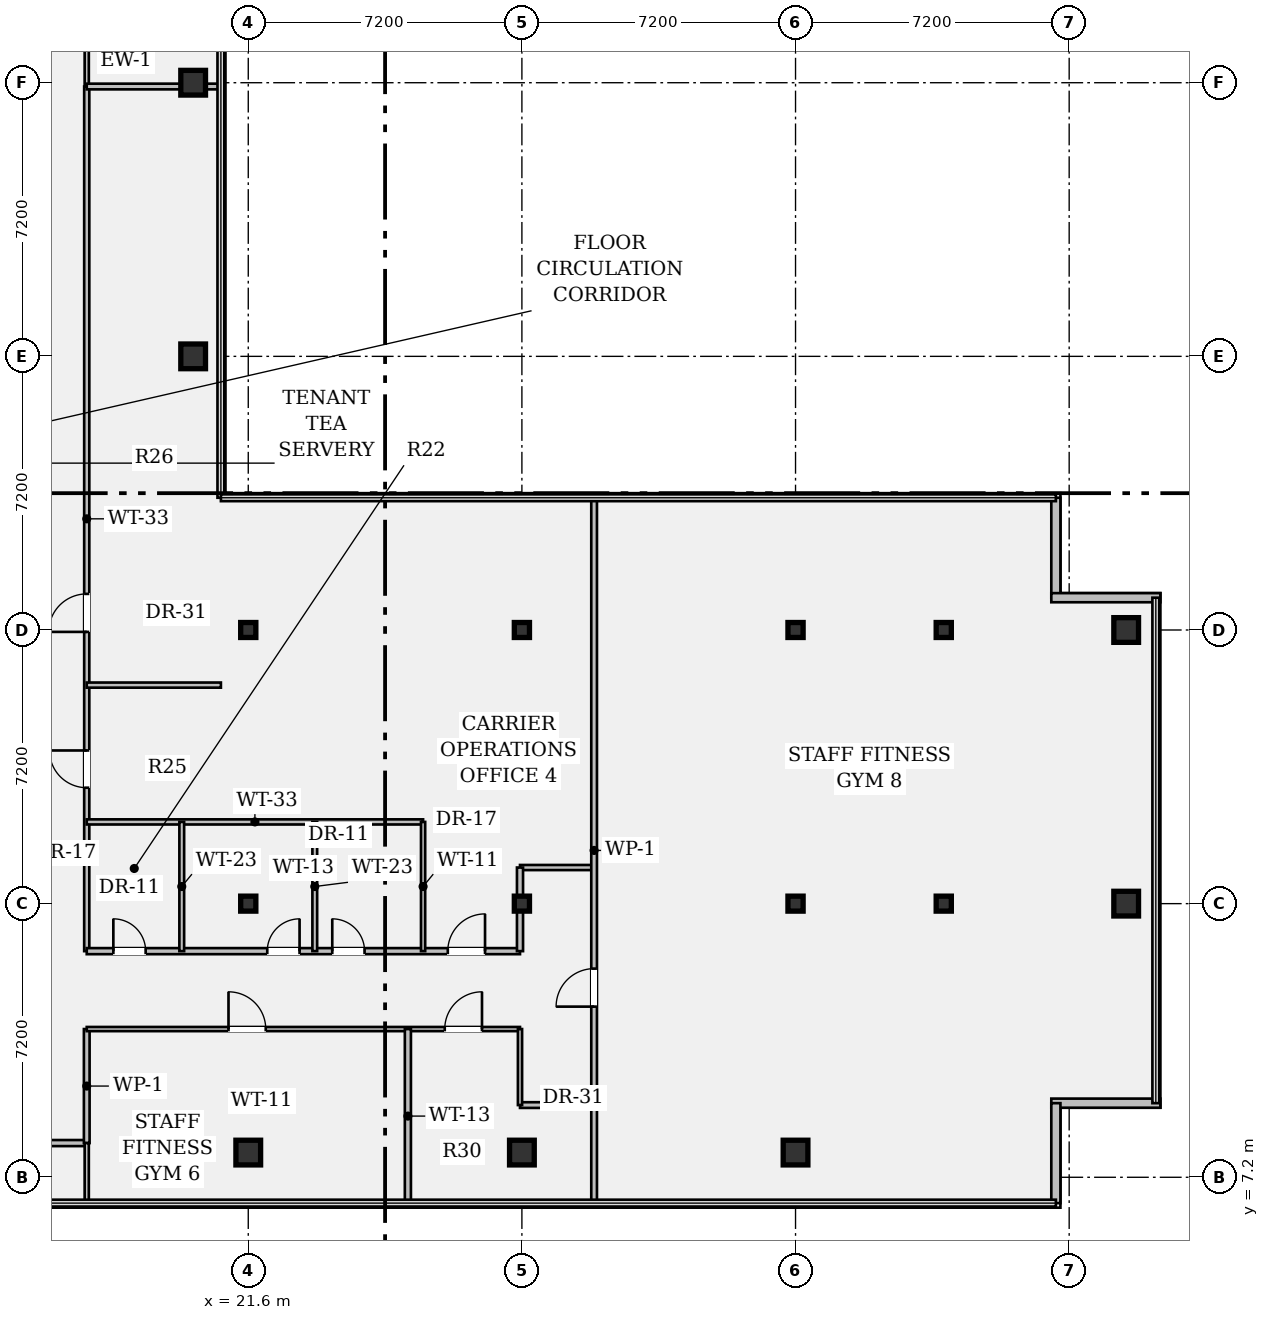
"""IFC4 building model, lengths in metres.
Left out: names, types, materials, properties, quantities, classifications, styles, units other than length and angle.
Written with IfcOpenShell. Run it as: python <this file> out.ifc"""

import sys

from ifc_helpers import new_model, si_unit, direction, frame, frame_2d, origin, origin_2d, place, context, subcontext, project, spatial, rectangle, hollow_rectangle, i_section, extrude, element, fill, save


model = new_model("IFC4")
c1 = context("Model", 3, precision=1e-05, world=origin(), true_north=direction((0.0, 1.0)))
c2 = subcontext(c1, "Body", "Model", "MODEL_VIEW")
j1 = project(units=[si_unit("LENGTHUNIT", "METRE"), si_unit("PLANEANGLEUNIT", "RADIAN")], contexts=[c1])
p1 = place(None, origin())
s1 = spatial("IfcSite", under=j1, at=p1, CompositionType="ELEMENT")
p2 = place(p1, origin())
s2 = spatial("IfcBuilding", under=s1, at=p2, CompositionType="ELEMENT")
p3 = place(p2, frame((0.0, 0.0, 276.15)))
s3 = spatial("IfcBuildingStorey", under=s2, at=p3, CompositionType="ELEMENT", Elevation=276.15)
for number, where, z_axis, x_axis in (
    (1, (20.15, 28.8, 0.0), (0.0, 0.0, 1.0), (1.0, 0.0, 0.0)),
    (2, (20.15, 36.0, 0.0), (0.0, 0.0, 1.0), (1.0, 0.0, 0.0)),
    (3, (21.6, 7.85, 0.0), (0.0, 0.0, 1.0), (1.0, 0.0, 0.0)),
):
    element("IfcColumn", number, at=place(p3, frame(where, z_axis=z_axis, x_axis=x_axis)), inside=s3, PredefinedType="COLUMN", context=c2, shape_type="SweptSolid", body=[
        extrude(hollow_rectangle(XDim=0.65, YDim=0.65, WallThickness=0.04, at=origin_2d()), origin(), (0.0, 0.0, 1.0), 3.24),
    ])
for number, where, z_axis, x_axis in (
    (4, (21.6, 14.4, 0.0), (0.0, 0.0, 1.0), (1.0, 0.0, 0.0)),
    (5, (21.6, 21.6, 0.0), (0.0, 0.0, 1.0), (1.0, 0.0, 0.0)),
):
    element("IfcColumn", number, at=place(p3, frame(where, z_axis=z_axis, x_axis=x_axis)), inside=s3, PredefinedType="COLUMN", context=c2, shape_type="SweptSolid", body=[
        extrude(i_section(OverallWidth=0.399, OverallDepth=0.394, WebThickness=0.023, FlangeThickness=0.037, FilletRadius=0.018, at=origin_2d()), origin(), (0.0, 0.0, 1.0), 3.24),
    ])
p4 = place(p3, frame((28.8, 7.85, 0.0), z_axis=(0.0, 0.0, 1.0), x_axis=(1.0, 0.0, 0.0)))
e6 = element("IfcColumn", 6, at=p4, inside=s3, PredefinedType="COLUMN", context=c2, shape_type="SweptSolid", body=[
    extrude(hollow_rectangle(XDim=0.65, YDim=0.65, WallThickness=0.04, at=origin_2d()), origin(), (0.0, 0.0, 1.0), 3.24),
])
for number, where, z_axis, x_axis in (
    (7, (28.8, 14.4, 0.0), (0.0, 0.0, 1.0), (1.0, 0.0, 0.0)),
    (8, (28.8, 21.6, 0.0), (0.0, 0.0, 1.0), (1.0, 0.0, 0.0)),
):
    element("IfcColumn", number, at=place(p3, frame(where, z_axis=z_axis, x_axis=x_axis)), inside=s3, PredefinedType="COLUMN", context=c2, shape_type="SweptSolid", body=[
        extrude(i_section(OverallWidth=0.399, OverallDepth=0.394, WebThickness=0.023, FlangeThickness=0.037, FilletRadius=0.018, at=origin_2d()), origin(), (0.0, 0.0, 1.0), 3.24),
    ])
p5 = place(p3, frame((36.0, 7.85, 0.0), z_axis=(0.0, 0.0, 1.0), x_axis=(1.0, 0.0, 0.0)))
e9 = element("IfcColumn", 9, at=p5, inside=s3, PredefinedType="COLUMN", context=c2, shape_type="SweptSolid", body=[
    extrude(hollow_rectangle(XDim=0.65, YDim=0.65, WallThickness=0.04, at=origin_2d()), origin(), (0.0, 0.0, 1.0), 3.24),
])
for number, where, z_axis, x_axis in (
    (10, (36.0, 14.4, 0.0), (0.0, 0.0, 1.0), (1.0, 0.0, 0.0)),
    (11, (36.0, 21.6, 0.0), (0.0, 0.0, 1.0), (1.0, 0.0, 0.0)),
    (12, (39.9, 14.4, 0.0), (0.0, 0.0, 1.0), (1.0, 0.0, 0.0)),
    (13, (39.9, 21.6, 0.0), (0.0, 0.0, 1.0), (1.0, 0.0, 0.0)),
):
    element("IfcColumn", number, at=place(p3, frame(where, z_axis=z_axis, x_axis=x_axis)), inside=s3, PredefinedType="COLUMN", context=c2, shape_type="SweptSolid", body=[
        extrude(i_section(OverallWidth=0.399, OverallDepth=0.394, WebThickness=0.023, FlangeThickness=0.037, FilletRadius=0.018, at=origin_2d()), origin(), (0.0, 0.0, 1.0), 3.24),
    ])
for number, where, z_axis, x_axis in (
    (14, (44.7, 14.4, 0.0), (0.0, 0.0, 1.0), (1.0, 0.0, 0.0)),
    (15, (44.7, 21.6, 0.0), (0.0, 0.0, 1.0), (1.0, 0.0, 0.0)),
):
    element("IfcColumn", number, at=place(p3, frame(where, z_axis=z_axis, x_axis=x_axis)), inside=s3, PredefinedType="COLUMN", context=c2, shape_type="SweptSolid", body=[
        extrude(hollow_rectangle(XDim=0.65, YDim=0.65, WallThickness=0.04, at=origin_2d()), origin(), (0.0, 0.0, 1.0), 3.24),
    ])
p6 = place(p3, frame((42.85, 25.08, 0.0), z_axis=(0.0, 0.0, 1.0), x_axis=(0.0, -1.0, 0.0)))
e16 = element("IfcWall", 16, at=p6, inside=s3, PredefinedType="STANDARD", context=c2, shape_type="SweptSolid", body=[
    extrude(rectangle(XDim=2.63, YDim=0.24, at=frame_2d((1.315, 0.0))), origin(), (0.0, 0.0, 1.0), 3.24),
])
for number, where, z_axis, x_axis in (
    (17, (42.73, 22.45, 0.0), (0.0, 0.0, 1.0), (1.0, 0.0, 0.0)),
    (18, (45.6, 9.15, 0.0), (0.0, 0.0, 1.0), (-1.0, 0.0, 0.0)),
):
    element("IfcWall", number, at=place(p3, frame(where, z_axis=z_axis, x_axis=x_axis)), inside=s3, PredefinedType="STANDARD", context=c2, shape_type="SweptSolid", body=[
        extrude(rectangle(XDim=2.87, YDim=0.24, at=frame_2d((1.435, 0.0))), origin(), (0.0, 0.0, 1.0), 3.24),
    ])
p7 = place(p3, frame((42.85, 9.15, 0.0), z_axis=(0.0, 0.0, 1.0), x_axis=(0.0, -1.0, 0.0)))
e19 = element("IfcWall", 19, at=p7, inside=s3, PredefinedType="STANDARD", context=c2, shape_type="SweptSolid", body=[
    extrude(rectangle(XDim=2.63, YDim=0.24, at=frame_2d((1.315, 0.0))), origin(), (0.0, 0.0, 1.0), 3.24),
])
p8 = place(p3, frame((14.4, 8.1, 0.0), z_axis=(0.0, 0.0, 1.0), x_axis=(1.0, 0.0, 0.0)))
e20 = element("IfcWall", 20, at=p8, inside=s3, PredefinedType="PARTITIONING", context=c2, shape_type="SweptSolid", body=[
    extrude(rectangle(XDim=2.95, YDim=0.16, at=frame_2d((1.475, 0.0))), origin(), (0.0, 0.0, 1.0), 3.24),
])
p9 = place(p8, frame((0.95, 0.0, 0.0)))
e21 = element("IfcOpeningElement", 21, at=p9, cuts=e20, PredefinedType="OPENING", context=c2, shape_type="SweptSolid", body=[
    extrude(rectangle(XDim=0.98, YDim=2.15, at=frame_2d((0.49, 1.075))), frame((0.0, 0.092, 0.0), z_axis=(0.0, -1.0, 0.0), x_axis=(1.0, 0.0, 0.0)), (0.0, 0.0, 1.0), 0.184),
])
p10 = place(p3, frame((17.35, 8.1, 0.0), z_axis=(0.0, 0.0, 1.0), x_axis=(0.0, 1.0, 0.0)))
e22 = element("IfcWall", 22, at=p10, inside=s3, PredefinedType="PARTITIONING", context=c2, shape_type="SweptSolid", body=[
    extrude(rectangle(XDim=3.0, YDim=0.15, at=frame_2d((1.5, 0.0))), origin(), (0.0, 0.0, 1.0), 3.24),
])
p11 = place(p3, frame((17.35, 13.15, 0.0), z_axis=(0.0, 0.0, 1.0), x_axis=(0.0, 1.0, 0.0)))
e23 = element("IfcWall", 23, at=p11, inside=s3, PredefinedType="PARTITIONING", context=c2, shape_type="SweptSolid", body=[
    extrude(rectangle(XDim=22.75, YDim=0.135, at=frame_2d((11.375, 0.0))), origin(), (0.0, 0.0, 1.0), 2.676),
])
p12 = place(p11, frame((4.3, 0.0, 0.0)))
e24 = element("IfcOpeningElement", 24, at=p12, cuts=e23, PredefinedType="OPENING", context=c2, shape_type="SweptSolid", body=[
    extrude(rectangle(XDim=0.98, YDim=2.15, at=frame_2d((0.49, 1.075))), frame((0.0, 0.08, 0.0), z_axis=(0.0, -1.0, 0.0), x_axis=(1.0, 0.0, 0.0)), (0.0, 0.0, 1.0), 0.159),
])
p13 = place(p11, frame((8.4, 0.0, 0.0)))
e25 = element("IfcOpeningElement", 25, at=p13, cuts=e23, PredefinedType="OPENING", context=c2, shape_type="SweptSolid", body=[
    extrude(rectangle(XDim=1.0, YDim=2.15, at=frame_2d((0.5, 1.075))), frame((0.0, 0.08, 0.0), z_axis=(0.0, -1.0, 0.0), x_axis=(1.0, 0.0, 0.0)), (0.0, 0.0, 1.0), 0.159),
])
p14 = place(p3, frame((17.35, 11.1, 0.0), z_axis=(0.0, 0.0, 1.0), x_axis=(1.0, 0.0, 0.0)))
e26 = element("IfcWall", 26, at=p14, inside=s3, PredefinedType="PARTITIONING", context=c2, shape_type="SweptSolid", body=[
    extrude(rectangle(XDim=11.4, YDim=0.11, at=frame_2d((5.7, 0.0))), origin(), (0.0, 0.0, 1.0), 2.676),
])
p15 = place(p14, frame((3.73, 0.0, 0.0)))
e27 = element("IfcOpeningElement", 27, at=p15, cuts=e26, PredefinedType="OPENING", context=c2, shape_type="SweptSolid", body=[
    extrude(rectangle(XDim=0.98, YDim=2.15, at=frame_2d((0.49, 1.075))), frame((0.0, 0.067, 0.0), z_axis=(0.0, -1.0, 0.0), x_axis=(1.0, 0.0, 0.0)), (0.0, 0.0, 1.0), 0.134),
])
p16 = place(p14, frame((9.42, 0.0, 0.0)))
e28 = element("IfcOpeningElement", 28, at=p16, cuts=e26, PredefinedType="OPENING", context=c2, shape_type="SweptSolid", body=[
    extrude(rectangle(XDim=0.98, YDim=2.15, at=frame_2d((0.49, 1.075))), frame((0.0, 0.067, 0.0), z_axis=(0.0, -1.0, 0.0), x_axis=(1.0, 0.0, 0.0)), (0.0, 0.0, 1.0), 0.134),
])
p17 = place(p3, frame((17.35, 13.15, 0.0), z_axis=(0.0, 0.0, 1.0), x_axis=(1.0, 0.0, 0.0)))
e29 = element("IfcWall", 29, at=p17, inside=s3, PredefinedType="PARTITIONING", context=c2, shape_type="SweptSolid", body=[
    extrude(rectangle(XDim=11.4, YDim=0.16, at=frame_2d((5.7, 0.0))), origin(), (0.0, 0.0, 1.0), 2.676),
])
p18 = place(p17, frame((0.7, 0.0, 0.0)))
e30 = element("IfcOpeningElement", 30, at=p18, cuts=e29, PredefinedType="OPENING", context=c2, shape_type="SweptSolid", body=[
    extrude(rectangle(XDim=0.85, YDim=2.15, at=frame_2d((0.425, 1.075))), frame((0.0, 0.092, 0.0), z_axis=(0.0, -1.0, 0.0), x_axis=(1.0, 0.0, 0.0)), (0.0, 0.0, 1.0), 0.184),
])
p19 = place(p17, frame((4.75, 0.0, 0.0)))
e31 = element("IfcOpeningElement", 31, at=p19, cuts=e29, PredefinedType="OPENING", context=c2, shape_type="SweptSolid", body=[
    extrude(rectangle(XDim=0.85, YDim=2.15, at=frame_2d((0.425, 1.075))), frame((0.0, 0.092, 0.0), z_axis=(0.0, -1.0, 0.0), x_axis=(1.0, 0.0, 0.0)), (0.0, 0.0, 1.0), 0.184),
])
p20 = place(p17, frame((6.46, 0.0, 0.0)))
e32 = element("IfcOpeningElement", 32, at=p20, cuts=e29, PredefinedType="OPENING", context=c2, shape_type="SweptSolid", body=[
    extrude(rectangle(XDim=0.85, YDim=2.15, at=frame_2d((0.425, 1.075))), frame((0.0, 0.092, 0.0), z_axis=(0.0, -1.0, 0.0), x_axis=(1.0, 0.0, 0.0)), (0.0, 0.0, 1.0), 0.184),
])
p21 = place(p17, frame((9.5, 0.0, 0.0)))
e33 = element("IfcOpeningElement", 33, at=p21, cuts=e29, PredefinedType="OPENING", context=c2, shape_type="SweptSolid", body=[
    extrude(rectangle(XDim=0.98, YDim=2.15, at=frame_2d((0.49, 1.075))), frame((0.0, 0.092, 0.0), z_axis=(0.0, -1.0, 0.0), x_axis=(1.0, 0.0, 0.0)), (0.0, 0.0, 1.0), 0.184),
])
p22 = place(p3, frame((28.75, 9.1, 0.0), z_axis=(0.0, 0.0, 1.0), x_axis=(1.0, 0.0, 0.0)))
e34 = element("IfcWall", 34, at=p22, inside=s3, PredefinedType="PARTITIONING", context=c2, shape_type="SweptSolid", body=[
    extrude(rectangle(XDim=1.95, YDim=0.15, at=frame_2d((0.975, 0.0))), origin(), (0.0, 0.0, 1.0), 2.676),
])
p23 = place(p3, frame((28.75, 15.35, 0.0), z_axis=(0.0, 0.0, 1.0), x_axis=(1.0, 0.0, 0.0)))
e35 = element("IfcWall", 35, at=p23, inside=s3, PredefinedType="PARTITIONING", context=c2, shape_type="SweptSolid", body=[
    extrude(rectangle(XDim=1.95, YDim=0.135, at=frame_2d((0.975, 0.0))), origin(), (0.0, 0.0, 1.0), 2.676),
])
p24 = place(p3, frame((28.75, 9.1, 0.0), z_axis=(0.0, 0.0, 1.0), x_axis=(0.0, 1.0, 0.0)))
e36 = element("IfcWall", 36, at=p24, inside=s3, PredefinedType="PARTITIONING", context=c2, shape_type="SweptSolid", body=[
    extrude(rectangle(XDim=2.0, YDim=0.11, at=frame_2d((1.0, 0.0))), origin(), (0.0, 0.0, 1.0), 2.676),
])
p25 = place(p3, frame((28.75, 13.15, 0.0), z_axis=(0.0, 0.0, 1.0), x_axis=(0.0, 1.0, 0.0)))
e37 = element("IfcWall", 37, at=p25, inside=s3, PredefinedType="PARTITIONING", context=c2, shape_type="SweptSolid", body=[
    extrude(rectangle(XDim=2.2, YDim=0.16, at=frame_2d((1.1, 0.0))), origin(), (0.0, 0.0, 1.0), 2.676),
])
p26 = place(p3, frame((30.7, 6.52, 0.0), z_axis=(0.0, 0.0, 1.0), x_axis=(0.0, 1.0, 0.0)))
e38 = element("IfcWall", 38, at=p26, inside=s3, PredefinedType="PARTITIONING", context=c2, shape_type="SweptSolid", body=[
    extrude(rectangle(XDim=18.56, YDim=0.15, at=frame_2d((9.28, 0.0))), origin(), (0.0, 0.0, 1.0), 2.676),
])
p27 = place(p26, frame((5.17, 0.0, 0.0)))
e39 = element("IfcOpeningElement", 39, at=p27, cuts=e38, PredefinedType="OPENING", context=c2, shape_type="SweptSolid", body=[
    extrude(rectangle(XDim=1.0, YDim=2.15, at=frame_2d((0.5, 1.075))), frame((0.0, 0.087, 0.0), z_axis=(0.0, -1.0, 0.0), x_axis=(1.0, 0.0, 0.0)), (0.0, 0.0, 1.0), 0.174),
])
p28 = place(p3, frame((17.35, 35.9, 0.0), z_axis=(0.0, 0.0, 1.0), x_axis=(0.0, 1.0, 0.0)))
e40 = element("IfcWall", 40, at=p28, inside=s3, PredefinedType="PARTITIONING", context=c2, shape_type="SweptSolid", body=[
    extrude(rectangle(XDim=2.4, YDim=0.11, at=frame_2d((1.2, 0.0))), origin(), (0.0, 0.0, 1.0), 2.676),
])
p29 = place(p3, frame((17.35, 35.9, 0.0), z_axis=(0.0, 0.0, 1.0), x_axis=(1.0, 0.0, 0.0)))
e41 = element("IfcWall", 41, at=p29, inside=s3, PredefinedType="PARTITIONING", context=c2, shape_type="SweptSolid", body=[
    extrude(rectangle(XDim=3.53, YDim=0.15, at=frame_2d((1.765, 0.0))), origin(), (0.0, 0.0, 1.0), 2.676),
])
p30 = place(p3, frame((17.35, 16.55, 0.0), z_axis=(0.0, 0.0, 1.0), x_axis=(1.0, 0.0, 0.0)))
e42 = element("IfcWall", 42, at=p30, inside=s3, PredefinedType="PARTITIONING", context=c2, shape_type="SweptSolid", body=[
    extrude(rectangle(XDim=8.85, YDim=0.135, at=frame_2d((4.425, 0.0))), origin(), (0.0, 0.0, 1.0), 2.676),
])
p31 = place(p3, frame((26.2, 13.15, 0.0), z_axis=(0.0, 0.0, 1.0), x_axis=(0.0, 1.0, 0.0)))
e43 = element("IfcWall", 43, at=p31, inside=s3, PredefinedType="PARTITIONING", context=c2, shape_type="SweptSolid", body=[
    extrude(rectangle(XDim=3.4, YDim=0.11, at=frame_2d((1.7, 0.0))), origin(), (0.0, 0.0, 1.0), 2.676),
])
for number, where, z_axis, x_axis in (
    (44, (19.85, 13.15, 0.0), (0.0, 0.0, 1.0), (0.0, 1.0, 0.0)),
    (45, (23.35, 13.15, 0.0), (0.0, 0.0, 1.0), (0.0, 1.0, 0.0)),
):
    element("IfcWall", number, at=place(p3, frame(where, z_axis=z_axis, x_axis=x_axis)), inside=s3, PredefinedType="PARTITIONING", context=c2, shape_type="SweptSolid", body=[
        extrude(rectangle(XDim=3.4, YDim=0.125, at=frame_2d((1.7, 0.0))), origin(), (0.0, 0.0, 1.0), 2.676),
    ])
p32 = place(p3, frame((17.35, 20.15, 0.0), z_axis=(0.0, 0.0, 1.0), x_axis=(1.0, 0.0, 0.0)))
e46 = element("IfcWall", 46, at=p32, inside=s3, PredefinedType="PARTITIONING", context=c2, shape_type="SweptSolid", body=[
    extrude(rectangle(XDim=3.53, YDim=0.135, at=frame_2d((1.765, 0.0))), origin(), (0.0, 0.0, 1.0), 2.808),
])
p33 = place(p3, frame((17.35, 6.52, 0.0), z_axis=(0.0, 0.0, 1.0), x_axis=(0.0, 1.0, 0.0)))
e47 = element("IfcWall", 47, at=p33, inside=s3, PredefinedType="PARTITIONING", context=c2, shape_type="SweptSolid", body=[
    extrude(rectangle(XDim=1.58, YDim=0.11, at=frame_2d((0.79, 0.0))), origin(), (0.0, 0.0, 1.0), 3.24),
])
p34 = place(p3, frame((25.8, 6.52, 0.0), z_axis=(0.0, 0.0, 1.0), x_axis=(0.0, 1.0, 0.0)))
e48 = element("IfcWall", 48, at=p34, inside=s3, PredefinedType="PARTITIONING", context=c2, shape_type="SweptSolid", body=[
    extrude(rectangle(XDim=4.58, YDim=0.16, at=frame_2d((2.29, 0.0))), origin(), (0.0, 0.0, 1.0), 2.676),
])
p35 = place(p18, origin())
e49 = element("IfcDoor", 49, at=p35, inside=s3, OperationType="SINGLE_SWING_LEFT", PredefinedType="DOOR", context=c2, shape_type="SweptSolid", body=[
    extrude(rectangle(XDim=0.85, YDim=2.15, at=frame_2d((0.425, 1.075))), frame((0.0, 0.025, 0.0), z_axis=(0.0, -1.0, 0.0), x_axis=(1.0, 0.0, 0.0)), (0.0, 0.0, 1.0), 0.05),
])
fill(e30, e49)
p36 = place(p19, origin())
e50 = element("IfcDoor", 50, at=p36, inside=s3, OperationType="SINGLE_SWING_RIGHT", PredefinedType="DOOR", context=c2, shape_type="SweptSolid", body=[
    extrude(rectangle(XDim=0.85, YDim=2.15, at=frame_2d((0.425, 1.075))), frame((0.0, 0.025, 0.0), z_axis=(0.0, -1.0, 0.0), x_axis=(1.0, 0.0, 0.0)), (0.0, 0.0, 1.0), 0.05),
])
fill(e31, e50)
p37 = place(p20, origin())
e51 = element("IfcDoor", 51, at=p37, inside=s3, OperationType="SINGLE_SWING_LEFT", PredefinedType="DOOR", context=c2, shape_type="SweptSolid", body=[
    extrude(rectangle(XDim=0.85, YDim=2.15, at=frame_2d((0.425, 1.075))), frame((0.0, 0.025, 0.0), z_axis=(0.0, -1.0, 0.0), x_axis=(1.0, 0.0, 0.0)), (0.0, 0.0, 1.0), 0.05),
])
fill(e32, e51)
p38 = place(p12, origin())
e52 = element("IfcDoor", 52, at=p38, inside=s3, OperationType="SINGLE_SWING_RIGHT", PredefinedType="DOOR", context=c2, shape_type="SweptSolid", body=[
    extrude(rectangle(XDim=0.98, YDim=2.15, at=frame_2d((0.49, 1.075))), frame((0.0, 0.025, 0.0), z_axis=(0.0, -1.0, 0.0), x_axis=(1.0, 0.0, 0.0)), (0.0, 0.0, 1.0), 0.05),
])
fill(e24, e52)
p39 = place(p13, origin())
e53 = element("IfcDoor", 53, at=p39, inside=s3, OperationType="SINGLE_SWING_LEFT", PredefinedType="DOOR", context=c2, shape_type="SweptSolid", body=[
    extrude(rectangle(XDim=1.0, YDim=2.15, at=frame_2d((0.5, 1.075))), frame((0.0, 0.025, 0.0), z_axis=(0.0, -1.0, 0.0), x_axis=(1.0, 0.0, 0.0)), (0.0, 0.0, 1.0), 0.05),
])
fill(e25, e53)
p40 = place(p21, origin())
e54 = element("IfcDoor", 54, at=p40, inside=s3, OperationType="SINGLE_SWING_RIGHT", PredefinedType="DOOR", context=c2, shape_type="SweptSolid", body=[
    extrude(rectangle(XDim=0.98, YDim=2.15, at=frame_2d((0.49, 1.075))), frame((0.0, 0.025, 0.0), z_axis=(0.0, -1.0, 0.0), x_axis=(1.0, 0.0, 0.0)), (0.0, 0.0, 1.0), 0.05),
])
fill(e33, e54)
p41 = place(p15, origin())
e55 = element("IfcDoor", 55, at=p41, inside=s3, OperationType="SINGLE_SWING_LEFT", PredefinedType="DOOR", context=c2, shape_type="SweptSolid", body=[
    extrude(rectangle(XDim=0.98, YDim=2.15, at=frame_2d((0.49, 1.075))), frame((0.0, 0.025, 0.0), z_axis=(0.0, -1.0, 0.0), x_axis=(1.0, 0.0, 0.0)), (0.0, 0.0, 1.0), 0.05),
])
fill(e27, e55)
p42 = place(p16, origin())
e56 = element("IfcDoor", 56, at=p42, inside=s3, OperationType="SINGLE_SWING_RIGHT", PredefinedType="DOOR", context=c2, shape_type="SweptSolid", body=[
    extrude(rectangle(XDim=0.98, YDim=2.15, at=frame_2d((0.49, 1.075))), frame((0.0, 0.025, 0.0), z_axis=(0.0, -1.0, 0.0), x_axis=(1.0, 0.0, 0.0)), (0.0, 0.0, 1.0), 0.05),
])
fill(e28, e56)
p43 = place(p27, origin())
e57 = element("IfcDoor", 57, at=p43, inside=s3, OperationType="SINGLE_SWING_LEFT", PredefinedType="DOOR", context=c2, shape_type="SweptSolid", body=[
    extrude(rectangle(XDim=1.0, YDim=2.15, at=frame_2d((0.5, 1.075))), frame((0.0, 0.025, 0.0), z_axis=(0.0, -1.0, 0.0), x_axis=(1.0, 0.0, 0.0)), (0.0, 0.0, 1.0), 0.05),
])
fill(e39, e57)
save(model, sys.argv[1])
